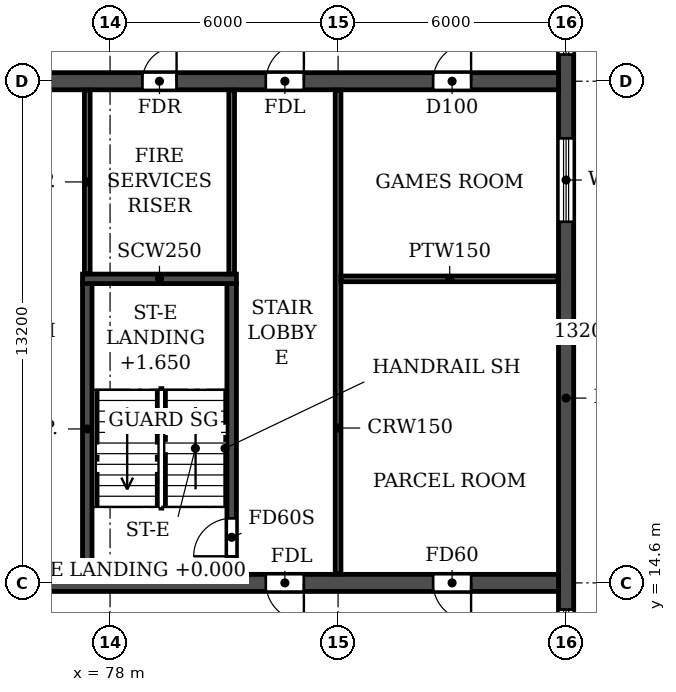
"""IFC4 building model, lengths in metres.
Left out: names, types, materials, properties, quantities, classifications, styles, units other than length and angle.
Written with IfcOpenShell. Run it as: python <this file> out.ifc"""

import sys

from ifc_helpers import new_model, si_unit, direction, frame, frame_2d, origin, place, context, subcontext, project, spatial, rectangle, extrude, element, fill, save


model = new_model("IFC4")
c1 = context("Model", 3, precision=1e-05, world=origin(), true_north=direction((0.0, 1.0)))
c2 = subcontext(c1, "Body", "Model", "MODEL_VIEW")
j1 = project(units=[si_unit("LENGTHUNIT", "METRE"), si_unit("PLANEANGLEUNIT", "RADIAN")], contexts=[c1])
p1 = place(None, origin())
s1 = spatial("IfcSite", under=j1, at=p1, CompositionType="ELEMENT")
p2 = place(p1, origin())
s2 = spatial("IfcBuilding", under=s1, at=p2, CompositionType="ELEMENT")
p3 = place(p2, frame((0.0, 0.0, 155.4)))
s3 = spatial("IfcBuildingStorey", under=s2, at=p3, CompositionType="ELEMENT", Elevation=155.4)
p4 = place(p3, frame((90.0, 4.683, 0.0), z_axis=(0.0, 0.0, 1.0), x_axis=(0.0, 1.0, 0.0)))
e1 = element("IfcWall", 1, at=p4, inside=s3, PredefinedType="SHEAR", context=c2, shape_type="SweptSolid", body=[
    extrude(rectangle(XDim=33.034, YDim=0.4, at=frame_2d((16.517, 0.0))), origin(), (0.0, 0.0, 1.0), 3.0),
])
p5 = place(p4, frame((23.817, 0.0, 0.9)))
e2 = element("IfcOpeningElement", 2, at=p5, cuts=e1, PredefinedType="OPENING", context=c2, shape_type="SweptSolid", body=[
    extrude(rectangle(XDim=1.2, YDim=1.5, at=frame_2d((0.6, 0.75))), frame((0.0, 0.21, 0.0), z_axis=(0.0, -1.0, 0.0), x_axis=(1.0, 0.0, 0.0)), (0.0, 0.0, 1.0), 0.42),
])
p6 = place(p4, frame((8.017, 0.0, 0.9)))
e3 = element("IfcOpeningElement", 3, at=p6, cuts=e1, PredefinedType="OPENING", context=c2, shape_type="SweptSolid", body=[
    extrude(rectangle(XDim=1.2, YDim=1.5, at=frame_2d((0.6, 0.75))), frame((0.0, 0.21, 0.0), z_axis=(0.0, -1.0, 0.0), x_axis=(1.0, 0.0, 0.0)), (0.0, 0.0, 1.0), 0.42),
])
p7 = place(p4, frame((28.293, 0.0, 0.6)))
e4 = element("IfcOpeningElement", 4, at=p7, cuts=e1, PredefinedType="OPENING", context=c2, shape_type="SweptSolid", body=[
    extrude(rectangle(XDim=2.2, YDim=1.8, at=frame_2d((1.1, 0.9))), frame((0.0, 0.21, 0.0), z_axis=(0.0, -1.0, 0.0), x_axis=(1.0, 0.0, 0.0)), (0.0, 0.0, 1.0), 0.42),
])
p8 = place(p4, frame((2.541, 0.0, 0.6)))
e5 = element("IfcOpeningElement", 5, at=p8, cuts=e1, PredefinedType="OPENING", context=c2, shape_type="SweptSolid", body=[
    extrude(rectangle(XDim=2.2, YDim=1.8, at=frame_2d((1.1, 0.9))), frame((0.0, 0.21, 0.0), z_axis=(0.0, -1.0, 0.0), x_axis=(1.0, 0.0, 0.0)), (0.0, 0.0, 1.0), 0.42),
])
p9 = place(p4, frame((19.417, 0.0, 0.6)))
e6 = element("IfcOpeningElement", 6, at=p9, cuts=e1, PredefinedType="OPENING", context=c2, shape_type="SweptSolid", body=[
    extrude(rectangle(XDim=2.2, YDim=1.8, at=frame_2d((1.1, 0.9))), frame((0.0, 0.21, 0.0), z_axis=(0.0, -1.0, 0.0), x_axis=(1.0, 0.0, 0.0)), (0.0, 0.0, 1.0), 0.42),
])
p10 = place(p3, frame((12.2, 14.6, 0.0), z_axis=(0.0, 0.0, 1.0), x_axis=(1.0, 0.0, 0.0)))
e7 = element("IfcWall", 7, at=p10, inside=s3, PredefinedType="SOLIDWALL", context=c2, shape_type="SweptSolid", body=[
    extrude(rectangle(XDim=77.6, YDim=0.45, at=frame_2d((38.8, 0.0))), origin(), (0.0, 0.0, 1.0), 3.0),
])
p11 = place(p10, frame((2.3, 0.0, 0.0)))
e8 = element("IfcOpeningElement", 8, at=p11, cuts=e7, PredefinedType="OPENING", context=c2, shape_type="SweptSolid", body=[
    extrude(rectangle(XDim=1.0, YDim=2.1, at=frame_2d((0.5, 1.05))), frame((0.0, 0.235, 0.0), z_axis=(0.0, -1.0, 0.0), x_axis=(1.0, 0.0, 0.0)), (0.0, 0.0, 1.0), 0.47),
])
p12 = place(p10, frame((6.7, 0.0, 0.0)))
e9 = element("IfcOpeningElement", 9, at=p12, cuts=e7, PredefinedType="OPENING", context=c2, shape_type="SweptSolid", body=[
    extrude(rectangle(XDim=1.0, YDim=2.1, at=frame_2d((0.5, 1.05))), frame((0.0, 0.235, 0.0), z_axis=(0.0, -1.0, 0.0), x_axis=(1.0, 0.0, 0.0)), (0.0, 0.0, 1.0), 0.47),
])
p13 = place(p10, frame((14.6, 0.0, 0.0)))
e10 = element("IfcOpeningElement", 10, at=p13, cuts=e7, PredefinedType="OPENING", context=c2, shape_type="SweptSolid", body=[
    extrude(rectangle(XDim=1.0, YDim=2.1, at=frame_2d((0.5, 1.05))), frame((0.0, 0.235, 0.0), z_axis=(0.0, -1.0, 0.0), x_axis=(1.0, 0.0, 0.0)), (0.0, 0.0, 1.0), 0.47),
])
p14 = place(p10, frame((19.2, 0.0, 0.0)))
e11 = element("IfcOpeningElement", 11, at=p14, cuts=e7, PredefinedType="OPENING", context=c2, shape_type="SweptSolid", body=[
    extrude(rectangle(XDim=1.0, YDim=2.1, at=frame_2d((0.5, 1.05))), frame((0.0, 0.235, 0.0), z_axis=(0.0, -1.0, 0.0), x_axis=(1.0, 0.0, 0.0)), (0.0, 0.0, 1.0), 0.47),
])
p15 = place(p10, frame((30.5, 0.0, 0.0)))
e12 = element("IfcOpeningElement", 12, at=p15, cuts=e7, PredefinedType="OPENING", context=c2, shape_type="SweptSolid", body=[
    extrude(rectangle(XDim=1.0, YDim=2.1, at=frame_2d((0.5, 1.05))), frame((0.0, 0.235, 0.0), z_axis=(0.0, -1.0, 0.0), x_axis=(1.0, 0.0, 0.0)), (0.0, 0.0, 1.0), 0.47),
])
p16 = place(p10, frame((34.15, 0.0, 0.0)))
e13 = element("IfcOpeningElement", 13, at=p16, cuts=e7, PredefinedType="OPENING", context=c2, shape_type="SweptSolid", body=[
    extrude(rectangle(XDim=1.5, YDim=2.1, at=frame_2d((0.75, 1.05))), frame((0.0, 0.235, 0.0), z_axis=(0.0, -1.0, 0.0), x_axis=(1.0, 0.0, 0.0)), (0.0, 0.0, 1.0), 0.47),
])
p17 = place(p10, frame((38.3, 0.0, 0.0)))
e14 = element("IfcOpeningElement", 14, at=p17, cuts=e7, PredefinedType="OPENING", context=c2, shape_type="SweptSolid", body=[
    extrude(rectangle(XDim=1.0, YDim=2.1, at=frame_2d((0.5, 1.05))), frame((0.0, 0.235, 0.0), z_axis=(0.0, -1.0, 0.0), x_axis=(1.0, 0.0, 0.0)), (0.0, 0.0, 1.0), 0.47),
])
p18 = place(p10, frame((43.5, 0.0, 0.0)))
e15 = element("IfcOpeningElement", 15, at=p18, cuts=e7, PredefinedType="OPENING", context=c2, shape_type="SweptSolid", body=[
    extrude(rectangle(XDim=1.0, YDim=2.1, at=frame_2d((0.5, 1.05))), frame((0.0, 0.235, 0.0), z_axis=(0.0, -1.0, 0.0), x_axis=(1.0, 0.0, 0.0)), (0.0, 0.0, 1.0), 0.47),
])
p19 = place(p10, frame((57.4, 0.0, 0.0)))
e16 = element("IfcOpeningElement", 16, at=p19, cuts=e7, PredefinedType="OPENING", context=c2, shape_type="SweptSolid", body=[
    extrude(rectangle(XDim=1.0, YDim=2.1, at=frame_2d((0.5, 1.05))), frame((0.0, 0.235, 0.0), z_axis=(0.0, -1.0, 0.0), x_axis=(1.0, 0.0, 0.0)), (0.0, 0.0, 1.0), 0.47),
])
p20 = place(p10, frame((62.0, 0.0, 0.0)))
e17 = element("IfcOpeningElement", 17, at=p20, cuts=e7, PredefinedType="OPENING", context=c2, shape_type="SweptSolid", body=[
    extrude(rectangle(XDim=1.0, YDim=2.1, at=frame_2d((0.5, 1.05))), frame((0.0, 0.235, 0.0), z_axis=(0.0, -1.0, 0.0), x_axis=(1.0, 0.0, 0.0)), (0.0, 0.0, 1.0), 0.47),
])
p21 = place(p10, frame((69.9, 0.0, 0.0)))
e18 = element("IfcOpeningElement", 18, at=p21, cuts=e7, PredefinedType="OPENING", context=c2, shape_type="SweptSolid", body=[
    extrude(rectangle(XDim=1.0, YDim=2.1, at=frame_2d((0.5, 1.05))), frame((0.0, 0.235, 0.0), z_axis=(0.0, -1.0, 0.0), x_axis=(1.0, 0.0, 0.0)), (0.0, 0.0, 1.0), 0.47),
])
p22 = place(p10, frame((74.3, 0.0, 0.0)))
e19 = element("IfcOpeningElement", 19, at=p22, cuts=e7, PredefinedType="OPENING", context=c2, shape_type="SweptSolid", body=[
    extrude(rectangle(XDim=1.0, YDim=2.1, at=frame_2d((0.5, 1.05))), frame((0.0, 0.235, 0.0), z_axis=(0.0, -1.0, 0.0), x_axis=(1.0, 0.0, 0.0)), (0.0, 0.0, 1.0), 0.47),
])
p23 = place(p3, frame((12.2, 27.8, 0.0), z_axis=(0.0, 0.0, 1.0), x_axis=(1.0, 0.0, 0.0)))
e20 = element("IfcWall", 20, at=p23, inside=s3, PredefinedType="SOLIDWALL", context=c2, shape_type="SweptSolid", body=[
    extrude(rectangle(XDim=77.6, YDim=0.45, at=frame_2d((38.8, 0.0))), origin(), (0.0, 0.0, 1.0), 3.0),
])
p24 = place(p23, frame((2.3, 0.0, 0.0)))
e21 = element("IfcOpeningElement", 21, at=p24, cuts=e20, PredefinedType="OPENING", context=c2, shape_type="SweptSolid", body=[
    extrude(rectangle(XDim=1.0, YDim=2.1, at=frame_2d((0.5, 1.05))), frame((0.0, 0.235, 0.0), z_axis=(0.0, -1.0, 0.0), x_axis=(1.0, 0.0, 0.0)), (0.0, 0.0, 1.0), 0.47),
])
p25 = place(p23, frame((6.7, 0.0, 0.0)))
e22 = element("IfcOpeningElement", 22, at=p25, cuts=e20, PredefinedType="OPENING", context=c2, shape_type="SweptSolid", body=[
    extrude(rectangle(XDim=1.0, YDim=2.1, at=frame_2d((0.5, 1.05))), frame((0.0, 0.235, 0.0), z_axis=(0.0, -1.0, 0.0), x_axis=(1.0, 0.0, 0.0)), (0.0, 0.0, 1.0), 0.47),
])
p26 = place(p23, frame((10.05, 0.0, 0.0)))
e23 = element("IfcOpeningElement", 23, at=p26, cuts=e20, PredefinedType="OPENING", context=c2, shape_type="SweptSolid", body=[
    extrude(rectangle(XDim=0.9, YDim=2.1, at=frame_2d((0.45, 1.05))), frame((0.0, 0.235, 0.0), z_axis=(0.0, -1.0, 0.0), x_axis=(1.0, 0.0, 0.0)), (0.0, 0.0, 1.0), 0.47),
])
p27 = place(p23, frame((19.25, 0.0, 0.0)))
e24 = element("IfcOpeningElement", 24, at=p27, cuts=e20, PredefinedType="OPENING", context=c2, shape_type="SweptSolid", body=[
    extrude(rectangle(XDim=0.9, YDim=2.1, at=frame_2d((0.45, 1.05))), frame((0.0, 0.235, 0.0), z_axis=(0.0, -1.0, 0.0), x_axis=(1.0, 0.0, 0.0)), (0.0, 0.0, 1.0), 0.47),
])
p28 = place(p23, frame((22.4, 0.0, 0.0)))
e25 = element("IfcOpeningElement", 25, at=p28, cuts=e20, PredefinedType="OPENING", context=c2, shape_type="SweptSolid", body=[
    extrude(rectangle(XDim=1.0, YDim=2.1, at=frame_2d((0.5, 1.05))), frame((0.0, 0.235, 0.0), z_axis=(0.0, -1.0, 0.0), x_axis=(1.0, 0.0, 0.0)), (0.0, 0.0, 1.0), 0.47),
])
p29 = place(p23, frame((27.6, 0.0, 0.0)))
e26 = element("IfcOpeningElement", 26, at=p29, cuts=e20, PredefinedType="OPENING", context=c2, shape_type="SweptSolid", body=[
    extrude(rectangle(XDim=1.0, YDim=2.1, at=frame_2d((0.5, 1.05))), frame((0.0, 0.235, 0.0), z_axis=(0.0, -1.0, 0.0), x_axis=(1.0, 0.0, 0.0)), (0.0, 0.0, 1.0), 0.47),
])
p30 = place(p23, frame((35.4, 0.0, 0.0)))
e27 = element("IfcOpeningElement", 27, at=p30, cuts=e20, PredefinedType="OPENING", context=c2, shape_type="SweptSolid", body=[
    extrude(rectangle(XDim=1.0, YDim=2.1, at=frame_2d((0.5, 1.05))), frame((0.0, 0.235, 0.0), z_axis=(0.0, -1.0, 0.0), x_axis=(1.0, 0.0, 0.0)), (0.0, 0.0, 1.0), 0.47),
])
p31 = place(p23, frame((38.3, 0.0, 0.0)))
e28 = element("IfcOpeningElement", 28, at=p31, cuts=e20, PredefinedType="OPENING", context=c2, shape_type="SweptSolid", body=[
    extrude(rectangle(XDim=1.0, YDim=2.1, at=frame_2d((0.5, 1.05))), frame((0.0, 0.235, 0.0), z_axis=(0.0, -1.0, 0.0), x_axis=(1.0, 0.0, 0.0)), (0.0, 0.0, 1.0), 0.47),
])
p32 = place(p23, frame((42.25, 0.0, 0.0)))
e29 = element("IfcOpeningElement", 29, at=p32, cuts=e20, PredefinedType="OPENING", context=c2, shape_type="SweptSolid", body=[
    extrude(rectangle(XDim=1.5, YDim=2.1, at=frame_2d((0.75, 1.05))), frame((0.0, 0.235, 0.0), z_axis=(0.0, -1.0, 0.0), x_axis=(1.0, 0.0, 0.0)), (0.0, 0.0, 1.0), 0.47),
])
p33 = place(p23, frame((47.7, 0.0, 0.0)))
e30 = element("IfcOpeningElement", 30, at=p33, cuts=e20, PredefinedType="OPENING", context=c2, shape_type="SweptSolid", body=[
    extrude(rectangle(XDim=1.0, YDim=2.1, at=frame_2d((0.5, 1.05))), frame((0.0, 0.235, 0.0), z_axis=(0.0, -1.0, 0.0), x_axis=(1.0, 0.0, 0.0)), (0.0, 0.0, 1.0), 0.47),
])
p34 = place(p23, frame((51.6, 0.0, 0.0)))
e31 = element("IfcOpeningElement", 31, at=p34, cuts=e20, PredefinedType="OPENING", context=c2, shape_type="SweptSolid", body=[
    extrude(rectangle(XDim=1.0, YDim=2.1, at=frame_2d((0.5, 1.05))), frame((0.0, 0.235, 0.0), z_axis=(0.0, -1.0, 0.0), x_axis=(1.0, 0.0, 0.0)), (0.0, 0.0, 1.0), 0.47),
])
p35 = place(p23, frame((54.2, 0.0, 0.0)))
e32 = element("IfcOpeningElement", 32, at=p35, cuts=e20, PredefinedType="OPENING", context=c2, shape_type="SweptSolid", body=[
    extrude(rectangle(XDim=1.0, YDim=2.1, at=frame_2d((0.5, 1.05))), frame((0.0, 0.235, 0.0), z_axis=(0.0, -1.0, 0.0), x_axis=(1.0, 0.0, 0.0)), (0.0, 0.0, 1.0), 0.47),
])
p36 = place(p23, frame((57.45, 0.0, 0.0)))
e33 = element("IfcOpeningElement", 33, at=p36, cuts=e20, PredefinedType="OPENING", context=c2, shape_type="SweptSolid", body=[
    extrude(rectangle(XDim=0.9, YDim=2.1, at=frame_2d((0.45, 1.05))), frame((0.0, 0.235, 0.0), z_axis=(0.0, -1.0, 0.0), x_axis=(1.0, 0.0, 0.0)), (0.0, 0.0, 1.0), 0.47),
])
p37 = place(p23, frame((66.65, 0.0, 0.0)))
e34 = element("IfcOpeningElement", 34, at=p37, cuts=e20, PredefinedType="OPENING", context=c2, shape_type="SweptSolid", body=[
    extrude(rectangle(XDim=0.9, YDim=2.1, at=frame_2d((0.45, 1.05))), frame((0.0, 0.235, 0.0), z_axis=(0.0, -1.0, 0.0), x_axis=(1.0, 0.0, 0.0)), (0.0, 0.0, 1.0), 0.47),
])
p38 = place(p23, frame((69.9, 0.0, 0.0)))
e35 = element("IfcOpeningElement", 35, at=p38, cuts=e20, PredefinedType="OPENING", context=c2, shape_type="SweptSolid", body=[
    extrude(rectangle(XDim=1.0, YDim=2.1, at=frame_2d((0.5, 1.05))), frame((0.0, 0.235, 0.0), z_axis=(0.0, -1.0, 0.0), x_axis=(1.0, 0.0, 0.0)), (0.0, 0.0, 1.0), 0.47),
])
p39 = place(p23, frame((74.3, 0.0, 0.0)))
e36 = element("IfcOpeningElement", 36, at=p39, cuts=e20, PredefinedType="OPENING", context=c2, shape_type="SweptSolid", body=[
    extrude(rectangle(XDim=1.0, YDim=2.1, at=frame_2d((0.5, 1.05))), frame((0.0, 0.235, 0.0), z_axis=(0.0, -1.0, 0.0), x_axis=(1.0, 0.0, 0.0)), (0.0, 0.0, 1.0), 0.47),
])
p40 = place(p3, frame((77.4, 14.825, 0.0), z_axis=(0.0, 0.0, 1.0), x_axis=(0.0, 1.0, 0.0)))
e37 = element("IfcWall", 37, at=p40, inside=s3, PredefinedType="SOLIDWALL", context=c2, shape_type="SweptSolid", body=[
    extrude(rectangle(XDim=7.65, YDim=0.25, at=frame_2d((3.825, 0.0))), origin(), (0.0, 0.0, 1.0), 3.0),
])
p41 = place(p3, frame((81.2, 14.825, 0.0), z_axis=(0.0, 0.0, 1.0), x_axis=(0.0, 1.0, 0.0)))
e38 = element("IfcWall", 38, at=p41, inside=s3, PredefinedType="SOLIDWALL", context=c2, shape_type="SweptSolid", body=[
    extrude(rectangle(XDim=7.65, YDim=0.25, at=frame_2d((3.825, 0.0))), origin(), (0.0, 0.0, 1.0), 3.0),
])
p42 = place(p41, frame((0.475, 0.0, 0.0)))
e39 = element("IfcOpeningElement", 39, at=p42, cuts=e38, PredefinedType="OPENING", context=c2, shape_type="SweptSolid", body=[
    extrude(rectangle(XDim=1.0, YDim=2.1, at=frame_2d((0.5, 1.05))), frame((0.0, 0.135, 0.0), z_axis=(0.0, -1.0, 0.0), x_axis=(1.0, 0.0, 0.0)), (0.0, 0.0, 1.0), 0.27),
])
p43 = place(p3, frame((77.275, 22.6, 0.0), z_axis=(0.0, 0.0, 1.0), x_axis=(1.0, 0.0, 0.0)))
e40 = element("IfcWall", 40, at=p43, inside=s3, PredefinedType="SOLIDWALL", context=c2, shape_type="SweptSolid", body=[
    extrude(rectangle(XDim=4.05, YDim=0.25, at=frame_2d((2.025, 0.0))), origin(), (0.0, 0.0, 1.0), 3.0),
])
p44 = place(p3, frame((84.0, 14.835, 0.0), z_axis=(0.0, 0.0, 1.0), x_axis=(0.0, 1.0, 0.0)))
e41 = element("IfcWall", 41, at=p44, inside=s3, PredefinedType="PARTITIONING", context=c2, shape_type="SweptSolid", body=[
    extrude(rectangle(XDim=12.73, YDim=0.15, at=frame_2d((6.365, 0.0))), origin(), (0.0, 0.0, 1.0), 3.0),
])
p45 = place(p3, frame((84.075, 22.6, 0.0), z_axis=(0.0, 0.0, 1.0), x_axis=(1.0, 0.0, 0.0)))
e42 = element("IfcWall", 42, at=p45, inside=s3, PredefinedType="PARTITIONING", context=c2, shape_type="SweptSolid", body=[
    extrude(rectangle(XDim=5.715, YDim=0.15, at=frame_2d((2.857, 0.0))), origin(), (0.0, 0.0, 1.0), 3.0),
])
for number, where, z_axis, x_axis in (
    (43, (77.4, 22.735, 0.0), (0.0, 0.0, 1.0), (0.0, 1.0, 0.0)),
    (44, (81.2, 22.735, 0.0), (0.0, 0.0, 1.0), (0.0, 1.0, 0.0)),
):
    element("IfcWall", number, at=place(p3, frame(where, z_axis=z_axis, x_axis=x_axis)), inside=s3, PredefinedType="PARTITIONING", context=c2, shape_type="SweptSolid", body=[
        extrude(rectangle(XDim=4.83, YDim=0.15, at=frame_2d((2.415, 0.0))), origin(), (0.0, 0.0, 1.0), 3.0),
    ])
p46 = place(p5, origin())
e45 = element("IfcWindow", 45, at=p46, inside=s3, PartitioningType="SINGLE_PANEL", PredefinedType="WINDOW", context=c2, shape_type="SweptSolid", body=[
    extrude(rectangle(XDim=1.2, YDim=1.5, at=frame_2d((0.6, 0.75))), frame((0.0, 0.03, 0.0), z_axis=(0.0, -1.0, 0.0), x_axis=(1.0, 0.0, 0.0)), (0.0, 0.0, 1.0), 0.06),
])
fill(e2, e45)
p47 = place(p6, origin())
e46 = element("IfcWindow", 46, at=p47, inside=s3, PartitioningType="SINGLE_PANEL", PredefinedType="WINDOW", context=c2, shape_type="SweptSolid", body=[
    extrude(rectangle(XDim=1.2, YDim=1.5, at=frame_2d((0.6, 0.75))), frame((0.0, 0.03, 0.0), z_axis=(0.0, -1.0, 0.0), x_axis=(1.0, 0.0, 0.0)), (0.0, 0.0, 1.0), 0.06),
])
fill(e3, e46)
p48 = place(p9, origin())
e47 = element("IfcWindow", 47, at=p48, inside=s3, PartitioningType="DOUBLE_PANEL_HORIZONTAL", PredefinedType="WINDOW", context=c2, shape_type="SweptSolid", body=[
    extrude(rectangle(XDim=2.2, YDim=1.8, at=frame_2d((1.1, 0.9))), frame((0.0, 0.03, 0.0), z_axis=(0.0, -1.0, 0.0), x_axis=(1.0, 0.0, 0.0)), (0.0, 0.0, 1.0), 0.06),
])
fill(e6, e47)
p49 = place(p37, origin())
e48 = element("IfcDoor", 48, at=p49, inside=s3, OperationType="SINGLE_SWING_RIGHT", PredefinedType="DOOR", context=c2, shape_type="SweptSolid", body=[
    extrude(rectangle(XDim=0.9, YDim=2.1, at=frame_2d((0.45, 1.05))), frame((0.0, 0.025, 0.0), z_axis=(0.0, -1.0, 0.0), x_axis=(1.0, 0.0, 0.0)), (0.0, 0.0, 1.0), 0.05),
])
fill(e34, e48)
p50 = place(p38, origin())
e49 = element("IfcDoor", 49, at=p50, inside=s3, OperationType="SINGLE_SWING_RIGHT", PredefinedType="DOOR", context=c2, shape_type="SweptSolid", body=[
    extrude(rectangle(XDim=1.0, YDim=2.1, at=frame_2d((0.5, 1.05))), frame((0.0, 0.025, 0.0), z_axis=(0.0, -1.0, 0.0), x_axis=(1.0, 0.0, 0.0)), (0.0, 0.0, 1.0), 0.05),
])
fill(e35, e49)
p51 = place(p39, origin())
e50 = element("IfcDoor", 50, at=p51, inside=s3, OperationType="SINGLE_SWING_RIGHT", PredefinedType="DOOR", context=c2, shape_type="SweptSolid", body=[
    extrude(rectangle(XDim=1.0, YDim=2.1, at=frame_2d((0.5, 1.05))), frame((0.0, 0.025, 0.0), z_axis=(0.0, -1.0, 0.0), x_axis=(1.0, 0.0, 0.0)), (0.0, 0.0, 1.0), 0.05),
])
fill(e36, e50)
p52 = place(p21, frame((1.0, 0.0, 0.0), z_axis=(0.0, 0.0, 1.0), x_axis=(-1.0, 0.0, 0.0)))
e51 = element("IfcDoor", 51, at=p52, inside=s3, OperationType="SINGLE_SWING_LEFT", PredefinedType="DOOR", context=c2, shape_type="SweptSolid", body=[
    extrude(rectangle(XDim=1.0, YDim=2.1, at=frame_2d((0.5, 1.05))), frame((0.0, 0.025, 0.0), z_axis=(0.0, -1.0, 0.0), x_axis=(1.0, 0.0, 0.0)), (0.0, 0.0, 1.0), 0.05),
])
fill(e18, e51)
p53 = place(p22, frame((1.0, 0.0, 0.0), z_axis=(0.0, 0.0, 1.0), x_axis=(-1.0, 0.0, 0.0)))
e52 = element("IfcDoor", 52, at=p53, inside=s3, OperationType="SINGLE_SWING_LEFT", PredefinedType="DOOR", context=c2, shape_type="SweptSolid", body=[
    extrude(rectangle(XDim=1.0, YDim=2.1, at=frame_2d((0.5, 1.05))), frame((0.0, 0.025, 0.0), z_axis=(0.0, -1.0, 0.0), x_axis=(1.0, 0.0, 0.0)), (0.0, 0.0, 1.0), 0.05),
])
fill(e19, e52)
p54 = place(p42, origin())
e53 = element("IfcDoor", 53, at=p54, inside=s3, OperationType="SINGLE_SWING_LEFT", PredefinedType="DOOR", context=c2, shape_type="SweptSolid", body=[
    extrude(rectangle(XDim=1.0, YDim=2.1, at=frame_2d((0.5, 1.05))), frame((0.0, 0.025, 0.0), z_axis=(0.0, -1.0, 0.0), x_axis=(1.0, 0.0, 0.0)), (0.0, 0.0, 1.0), 0.05),
])
fill(e39, e53)
save(model, sys.argv[1])
